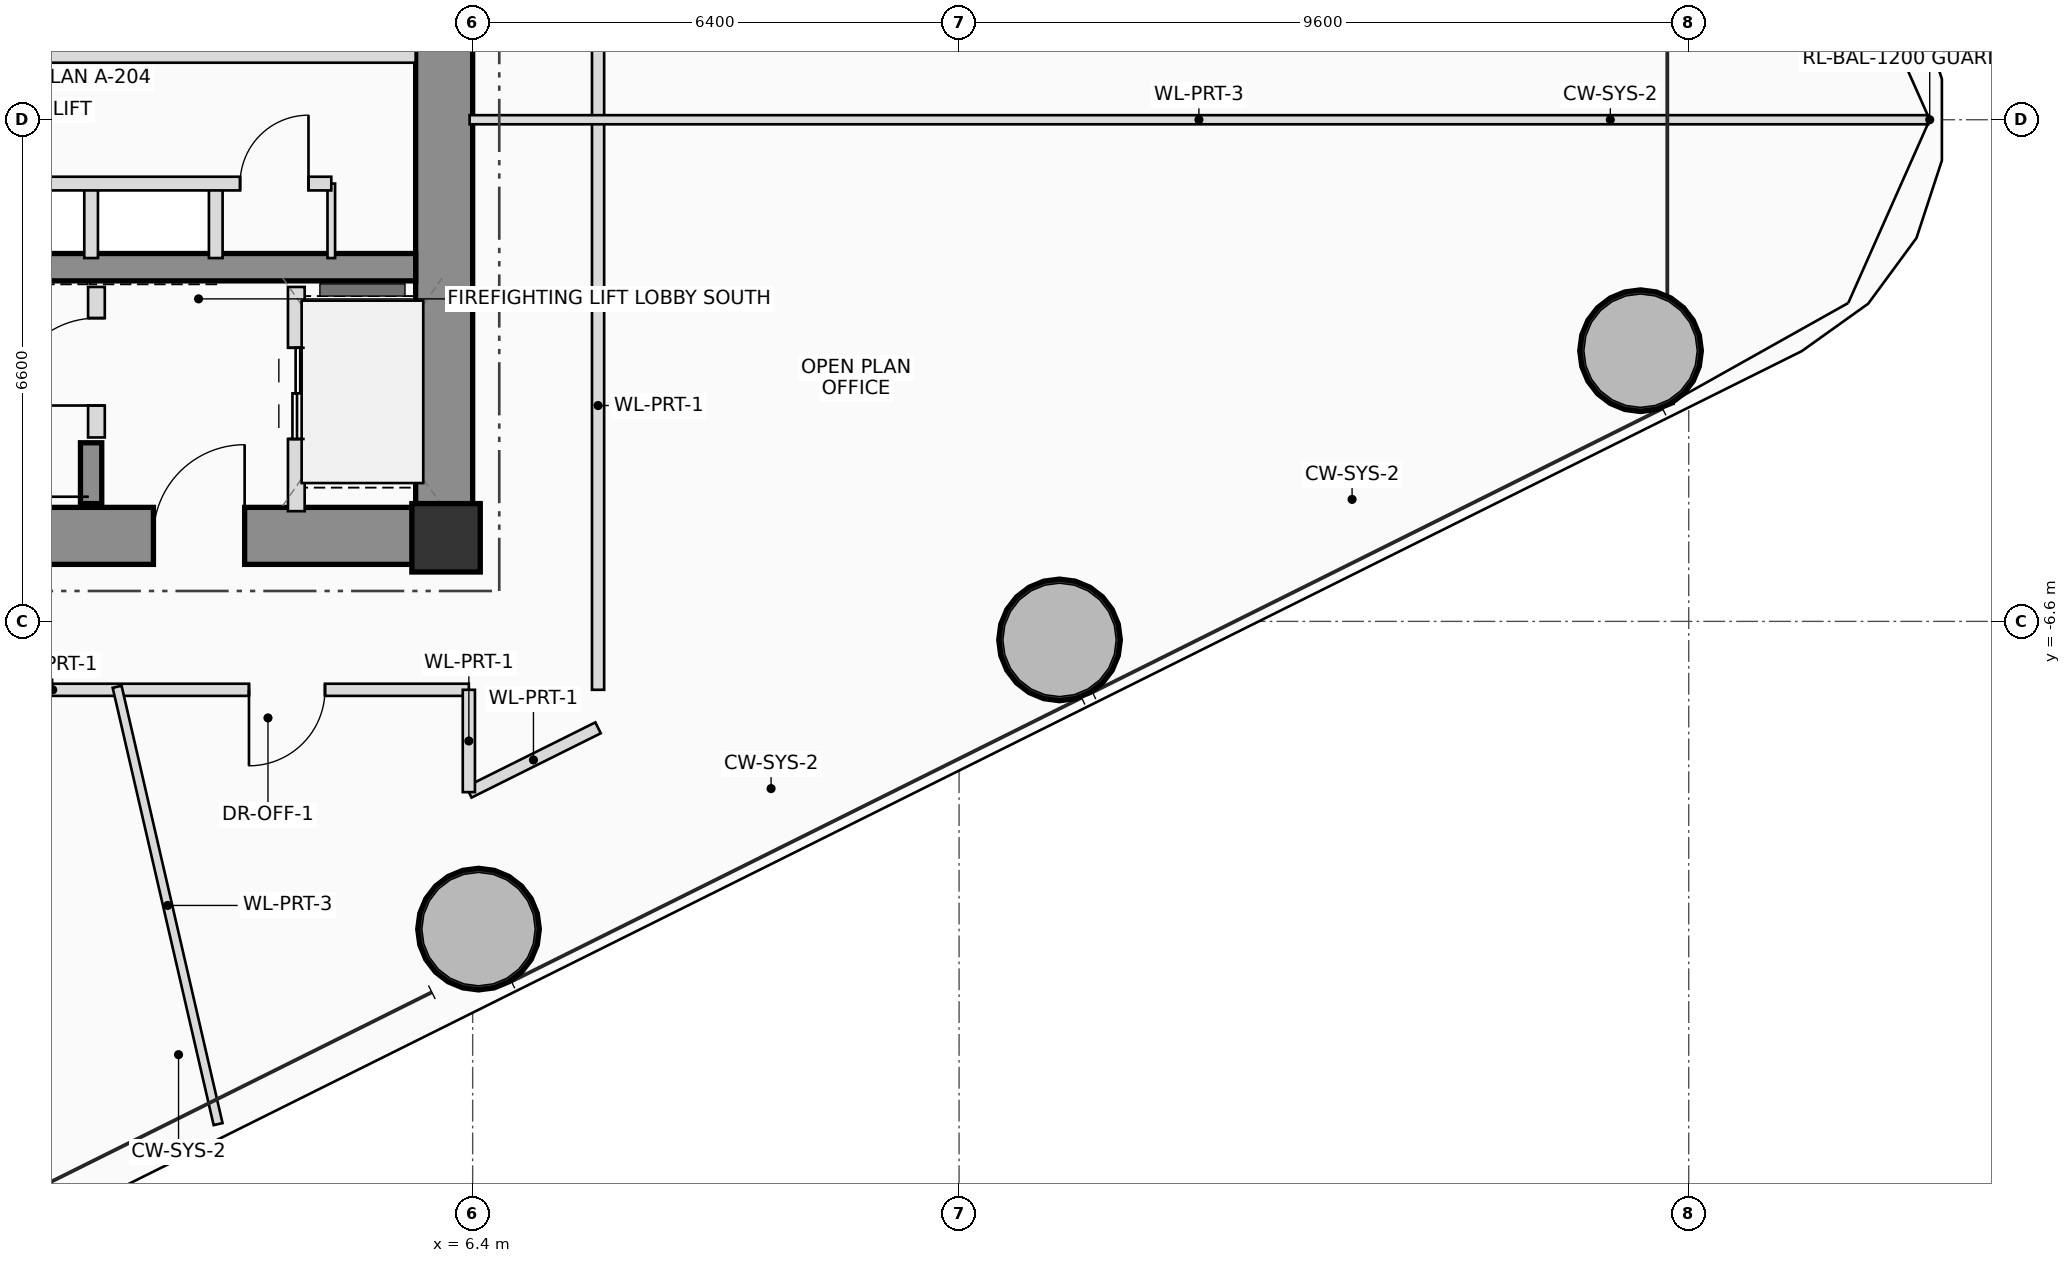
"""IFC4 building model, lengths in metres.
Left out: names, types, materials, properties, quantities, classifications, styles, units other than length and angle.
Written with IfcOpenShell. Run it as: python <this file> out.ifc"""

import sys

from ifc_helpers import new_model, si_unit, direction, frame, frame_2d, origin, origin_2d, place, context, subcontext, project, spatial, rectangle, hollow_circle, extrude, source, transform, mapped, element, fill, save


model = new_model("IFC4")
c1 = context("Model", 3, precision=1e-05, world=origin(), true_north=direction((0.0, 1.0)))
c2 = subcontext(c1, "Body", "Model", "MODEL_VIEW")
j1 = project(units=[si_unit("LENGTHUNIT", "METRE"), si_unit("PLANEANGLEUNIT", "RADIAN")], contexts=[c1])
p1 = place(None, origin())
s1 = spatial("IfcSite", under=j1, at=p1, CompositionType="ELEMENT")
p2 = place(p1, origin())
s2 = spatial("IfcBuilding", under=s1, at=p2, CompositionType="ELEMENT")
p3 = place(p2, frame((0.0, 0.0, 27.5)))
s3 = spatial("IfcBuildingStorey", under=s2, at=p3, CompositionType="ELEMENT", Elevation=27.5)
m1 = source(origin(), c2, "Body", "SweptSolid", [
    extrude(rectangle(XDim=0.9, YDim=0.9, at=origin_2d()), origin(), (0.0, 0.0, 1.0), 3.7),
])
p4 = place(p3, frame((6.05, -5.5, 0.0), z_axis=(0.0, 0.0, 1.0), x_axis=(1.0, 0.0, 0.0)))
e1 = element("IfcColumn", 1, at=p4, inside=s3, PredefinedType="COLUMN", context=c2, shape_type="MappedRepresentation", body=[
    mapped(m1, transform((0.0, 0.0, 0.0), scale=1.0)),
])
p5 = place(p3, frame((-6.4, -5.475, 0.0), z_axis=(0.0, 0.0, 1.0), x_axis=(1.0, 0.0, 0.0)))
e2 = element("IfcWall", 2, at=p5, inside=s3, PredefinedType="SHEAR", context=c2, shape_type="SweptSolid", body=[
    extrude(rectangle(XDim=12.8, YDim=0.75, at=frame_2d((6.4, 0.0))), origin(), (0.0, 0.0, 1.0), 3.7),
])
p6 = place(p5, frame((8.6, 0.0, 0.0)))
e3 = element("IfcOpeningElement", 3, at=p6, cuts=e2, PredefinedType="OPENING", context=c2, shape_type="SweptSolid", body=[
    extrude(rectangle(XDim=1.2, YDim=2.2, at=frame_2d((0.6, 1.1))), frame((0.0, 0.385, 0.0), z_axis=(0.0, -1.0, 0.0), x_axis=(1.0, 0.0, 0.0)), (0.0, 0.0, 1.0), 0.77),
])
p7 = place(p3, frame((6.025, -5.1, 0.0), z_axis=(0.0, 0.0, 1.0), x_axis=(0.0, 1.0, 0.0)))
e4 = element("IfcWall", 4, at=p7, inside=s3, PredefinedType="SHEAR", context=c2, shape_type="SweptSolid", body=[
    extrude(rectangle(XDim=10.2, YDim=0.75, at=frame_2d((5.1, 0.0))), origin(), (0.0, 0.0, 1.0), 3.7),
])
p8 = place(p3, frame((-5.65, -1.94, 0.0), z_axis=(0.0, 0.0, 1.0), x_axis=(1.0, 0.0, 0.0)))
e5 = element("IfcWall", 5, at=p8, inside=s3, PredefinedType="SHEAR", context=c2, shape_type="SweptSolid", body=[
    extrude(rectangle(XDim=11.3, YDim=0.36, at=frame_2d((5.65, 0.0))), origin(), (0.0, 0.0, 1.0), 3.7),
])
p9 = place(p3, frame((1.38, -5.05, 0.0), z_axis=(0.0, 0.0, 1.0), x_axis=(0.0, 1.0, 0.0)))
e6 = element("IfcWall", 6, at=p9, inside=s3, PredefinedType="SHEAR", context=c2, shape_type="SweptSolid", body=[
    extrude(rectangle(XDim=0.8, YDim=0.28, at=frame_2d((0.4, 0.0))), origin(), (0.0, 0.0, 1.0), 3.7),
])
m2 = source(origin(), c2, "Body", "SweptSolid", [
    extrude(hollow_circle(Radius=0.8, WallThickness=0.055, at=origin_2d()), origin(), (0.0, 0.0, 1.0), 3.7),
])
for number, where, z_axis, x_axis in (
    (7, (6.477, -10.648, 0.0), (0.0, 0.0, 1.0), (1.0, 0.0, 0.0)),
    (8, (14.122, -6.844, 0.0), (0.0, 0.0, 1.0), (1.0, 0.0, 0.0)),
    (9, (21.766, -3.039, 0.0), (0.0, 0.0, 1.0), (1.0, 0.0, 0.0)),
):
    element("IfcColumn", number, at=place(p3, frame(where, z_axis=z_axis, x_axis=x_axis)), inside=s3, PredefinedType="COLUMN", context=c2, shape_type="MappedRepresentation", body=[
        mapped(m2, transform((0.0, 0.0, 0.0), scale=1.0)),
    ])
p10 = place(p3, frame((1.45, -4.18, 0.0), z_axis=(0.0, 0.0, 1.0), x_axis=(0.0, 1.0, 0.0)))
e10 = element("IfcWall", 10, at=p10, inside=s3, PredefinedType="PLUMBINGWALL", context=c2, shape_type="SweptSolid", body=[
    extrude(rectangle(XDim=1.98, YDim=0.22, at=frame_2d((0.99, 0.0))), origin(), (0.0, 0.0, 1.0), 3.495),
])
p11 = place(p10, frame((0.42, 0.0, 0.0)))
e11 = element("IfcOpeningElement", 11, at=p11, cuts=e10, PredefinedType="OPENING", context=c2, shape_type="SweptSolid", body=[
    extrude(rectangle(XDim=1.15, YDim=2.15, at=frame_2d((0.575, 1.075))), frame((0.0, 0.12, 0.0), z_axis=(0.0, -1.0, 0.0), x_axis=(1.0, 0.0, 0.0)), (0.0, 0.0, 1.0), 0.24),
])
p12 = place(p3, frame((4.08, -5.15, 0.0), z_axis=(0.0, 0.0, 1.0), x_axis=(0.0, 1.0, 0.0)))
e12 = element("IfcWall", 12, at=p12, inside=s3, PredefinedType="PLUMBINGWALL", context=c2, shape_type="SweptSolid", body=[
    extrude(rectangle(XDim=2.95, YDim=0.22, at=frame_2d((1.475, 0.0))), origin(), (0.0, 0.0, 1.0), 3.495),
])
p13 = place(p12, frame((0.95, 0.0, 0.0)))
e13 = element("IfcOpeningElement", 13, at=p13, cuts=e12, PredefinedType="OPENING", context=c2, shape_type="SweptSolid", body=[
    extrude(rectangle(XDim=1.2, YDim=2.25, at=frame_2d((0.6, 1.125))), frame((0.0, 0.12, 0.0), z_axis=(0.0, -1.0, 0.0), x_axis=(1.0, 0.0, 0.0)), (0.0, 0.0, 1.0), 0.24),
])
for number, where, z_axis, x_axis in (
    (14, (1.38, 0.84, 0.0), (0.0, 0.0, 1.0), (0.0, 1.0, 0.0)),
    (15, (1.38, -1.82, 0.0), (0.0, 0.0, 1.0), (0.0, 1.0, 0.0)),
    (16, (3.02, 0.84, 0.0), (0.0, 0.0, 1.0), (0.0, 1.0, 0.0)),
    (17, (4.38, 0.84, 0.0), (0.0, 0.0, 1.0), (0.0, 1.0, 0.0)),
    (18, (3.02, -1.82, 0.0), (0.0, 0.0, 1.0), (0.0, 1.0, 0.0)),
):
    element("IfcWall", number, at=place(p3, frame(where, z_axis=z_axis, x_axis=x_axis)), inside=s3, PredefinedType="PLUMBINGWALL", context=c2, shape_type="SweptSolid", body=[
        extrude(rectangle(XDim=0.98, YDim=0.18, at=frame_2d((0.49, 0.0))), origin(), (0.0, 0.0, 1.0), 3.495),
    ])
p14 = place(p3, frame((4.54, -1.82, 0.0), z_axis=(0.0, 0.0, 1.0), x_axis=(0.0, 1.0, 0.0)))
e19 = element("IfcWall", 19, at=p14, inside=s3, PredefinedType="PARTITIONING", context=c2, shape_type="SweptSolid", body=[
    extrude(rectangle(XDim=0.98, YDim=0.1, at=frame_2d((0.49, 0.0))), origin(), (0.0, 0.0, 1.0), 3.495),
])
p15 = place(p3, frame((-5.68, 0.84, 0.0), z_axis=(0.0, 0.0, 1.0), x_axis=(1.0, 0.0, 0.0)))
e20 = element("IfcWall", 20, at=p15, inside=s3, PredefinedType="PLUMBINGWALL", context=c2, shape_type="SweptSolid", body=[
    extrude(rectangle(XDim=11.33, YDim=0.18, at=frame_2d((5.665, 0.0))), origin(), (0.0, 0.0, 1.0), 3.495),
])
p16 = place(p15, frame((0.43, 0.0, 0.0)))
e21 = element("IfcOpeningElement", 21, at=p16, cuts=e20, PredefinedType="OPENING", context=c2, shape_type="SweptSolid", body=[
    extrude(rectangle(XDim=1.1, YDim=2.2, at=frame_2d((0.55, 1.1))), frame((0.0, 0.1, 0.0), z_axis=(0.0, -1.0, 0.0), x_axis=(1.0, 0.0, 0.0)), (0.0, 0.0, 1.0), 0.2),
])
p17 = place(p15, frame((2.13, 0.0, 0.0)))
e22 = element("IfcOpeningElement", 22, at=p17, cuts=e20, PredefinedType="OPENING", context=c2, shape_type="SweptSolid", body=[
    extrude(rectangle(XDim=1.1, YDim=2.2, at=frame_2d((0.55, 1.1))), frame((0.0, 0.1, 0.0), z_axis=(0.0, -1.0, 0.0), x_axis=(1.0, 0.0, 0.0)), (0.0, 0.0, 1.0), 0.2),
])
p18 = place(p3, frame((-5.68, -0.84, 0.0), z_axis=(0.0, 0.0, 1.0), x_axis=(1.0, 0.0, 0.0)))
e23 = element("IfcWall", 23, at=p18, inside=s3, PredefinedType="PLUMBINGWALL", context=c2, shape_type="SweptSolid", body=[
    extrude(rectangle(XDim=10.22, YDim=0.18, at=frame_2d((5.11, 0.0))), origin(), (0.0, 0.0, 1.0), 3.495),
])
p19 = place(p18, frame((0.43, 0.0, 0.0)))
e24 = element("IfcOpeningElement", 24, at=p19, cuts=e23, PredefinedType="OPENING", context=c2, shape_type="SweptSolid", body=[
    extrude(rectangle(XDim=1.1, YDim=2.2, at=frame_2d((0.55, 1.1))), frame((0.0, 0.1, 0.0), z_axis=(0.0, -1.0, 0.0), x_axis=(1.0, 0.0, 0.0)), (0.0, 0.0, 1.0), 0.2),
])
p20 = place(p18, frame((2.13, 0.0, 0.0)))
e25 = element("IfcOpeningElement", 25, at=p20, cuts=e23, PredefinedType="OPENING", context=c2, shape_type="SweptSolid", body=[
    extrude(rectangle(XDim=1.1, YDim=2.2, at=frame_2d((0.55, 1.1))), frame((0.0, 0.1, 0.0), z_axis=(0.0, -1.0, 0.0), x_axis=(1.0, 0.0, 0.0)), (0.0, 0.0, 1.0), 0.2),
])
p21 = place(p18, frame((9.02, 0.0, 0.0)))
e26 = element("IfcOpeningElement", 26, at=p21, cuts=e23, PredefinedType="OPENING", context=c2, shape_type="SweptSolid", body=[
    extrude(rectangle(XDim=0.9, YDim=2.05, at=frame_2d((0.45, 1.025))), frame((0.0, 0.1, 0.0), z_axis=(0.0, -1.0, 0.0), x_axis=(1.0, 0.0, 0.0)), (0.0, 0.0, 1.0), 0.2),
])
p22 = place(p3, frame((6.35, -7.5, 0.0), z_axis=(0.0, 0.0, 1.0), x_axis=(-1.0, 0.0, 0.0)))
e27 = element("IfcWall", 27, at=p22, inside=s3, PredefinedType="PARTITIONING", context=c2, shape_type="SweptSolid", body=[
    extrude(rectangle(XDim=12.7, YDim=0.16, at=frame_2d((6.35, 0.0))), origin(), (0.0, 0.0, 1.0), 2.8),
])
p23 = place(p22, frame((1.893, 0.0, 0.0)))
e28 = element("IfcOpeningElement", 28, at=p23, cuts=e27, PredefinedType="OPENING", context=c2, shape_type="SweptSolid", body=[
    extrude(rectangle(XDim=1.0, YDim=2.25, at=frame_2d((0.5, 1.125))), frame((0.0, 0.09, 0.0), z_axis=(0.0, -1.0, 0.0), x_axis=(1.0, 0.0, 0.0)), (0.0, 0.0, 1.0), 0.18),
])
p24 = place(p22, frame((8.057, 0.0, 0.0)))
e29 = element("IfcOpeningElement", 29, at=p24, cuts=e27, PredefinedType="OPENING", context=c2, shape_type="SweptSolid", body=[
    extrude(rectangle(XDim=1.0, YDim=2.25, at=frame_2d((0.5, 1.125))), frame((0.0, 0.09, 0.0), z_axis=(0.0, -1.0, 0.0), x_axis=(1.0, 0.0, 0.0)), (0.0, 0.0, 1.0), 0.18),
])
for number, where, z_axis, x_axis in (
    (30, (8.05, 7.5, 0.0), (0.0, 0.0, 1.0), (0.0, -1.0, 0.0)),
    (31, (8.05, -0.02, 0.0), (0.0, 0.0, 1.0), (0.0, -1.0, 0.0)),
):
    element("IfcWall", number, at=place(p3, frame(where, z_axis=z_axis, x_axis=x_axis)), inside=s3, PredefinedType="PARTITIONING", context=c2, shape_type="SweptSolid", body=[
        extrude(rectangle(XDim=7.48, YDim=0.16, at=frame_2d((3.74, 0.0))), origin(), (0.0, 0.0, 1.0), 2.8),
    ])
p25 = place(p3, frame((8.05, -8.0, 0.0), z_axis=(0.0, 0.0, 1.0), x_axis=(-0.895274181873, -0.445515588136, 0.0)))
e32 = element("IfcWall", 32, at=p25, inside=s3, PredefinedType="PARTITIONING", context=c2, shape_type="SweptSolid", body=[
    extrude(rectangle(XDim=1.899, YDim=0.16, at=frame_2d((0.949, 0.0))), origin(), (0.0, 0.0, 1.0), 2.8),
])
p26 = place(p3, frame((6.35, -8.846, 0.0), z_axis=(0.0, 0.0, 1.0), x_axis=(0.0, 1.0, 0.0)))
e33 = element("IfcWall", 33, at=p26, inside=s3, PredefinedType="PARTITIONING", context=c2, shape_type="SweptSolid", body=[
    extrude(rectangle(XDim=1.346, YDim=0.16, at=frame_2d((0.673, 0.0))), origin(), (0.0, 0.0, 1.0), 2.8),
])
p27 = place(p3, frame((6.36, 0.0, 0.0), z_axis=(0.0, 0.0, 1.0), x_axis=(1.0, 0.0, 0.0)))
e34 = element("IfcWall", 34, at=p27, inside=s3, PredefinedType="PARTITIONING", context=c2, shape_type="SweptSolid", body=[
    extrude(rectangle(XDim=19.191, YDim=0.12, at=frame_2d((9.595, 0.0))), origin(), (0.0, 0.0, 1.0), 2.96),
])
p28 = place(p3, frame((1.722, -7.46, 0.0), z_axis=(0.0, 0.0, 1.0), x_axis=(0.22494706926, -0.974370984806, 0.0)))
e35 = element("IfcWall", 35, at=p28, inside=s3, PredefinedType="PARTITIONING", context=c2, shape_type="SweptSolid", body=[
    extrude(rectangle(XDim=5.905, YDim=0.12, at=frame_2d((2.953, 0.0))), origin(), (0.0, 0.0, 1.0), 2.96),
])
p29 = place(p6, origin())
e36 = element("IfcDoor", 36, at=p29, inside=s3, OperationType="SINGLE_SWING_RIGHT", PredefinedType="DOOR", context=c2, shape_type="SweptSolid", body=[
    extrude(rectangle(XDim=1.2, YDim=2.2, at=frame_2d((0.6, 1.1))), frame((0.0, 0.025, 0.0), z_axis=(0.0, -1.0, 0.0), x_axis=(1.0, 0.0, 0.0)), (0.0, 0.0, 1.0), 0.05),
])
fill(e3, e36)
p30 = place(p11, origin())
e37 = element("IfcDoor", 37, at=p30, inside=s3, OperationType="SINGLE_SWING_LEFT", PredefinedType="DOOR", context=c2, shape_type="SweptSolid", body=[
    extrude(rectangle(XDim=1.15, YDim=2.15, at=frame_2d((0.575, 1.075))), frame((0.0, 0.025, 0.0), z_axis=(0.0, -1.0, 0.0), x_axis=(1.0, 0.0, 0.0)), (0.0, 0.0, 1.0), 0.05),
])
fill(e11, e37)
p31 = place(p13, origin())
e38 = element("IfcDoor", 38, at=p31, inside=s3, OperationType="DOUBLE_DOOR_SLIDING", PredefinedType="DOOR", context=c2, shape_type="SweptSolid", body=[
    extrude(rectangle(XDim=1.2, YDim=2.25, at=frame_2d((0.6, 1.125))), frame((0.0, 0.025, 0.0), z_axis=(0.0, -1.0, 0.0), x_axis=(1.0, 0.0, 0.0)), (0.0, 0.0, 1.0), 0.05),
])
fill(e13, e38)
p32 = place(p21, origin())
e39 = element("IfcDoor", 39, at=p32, inside=s3, OperationType="SINGLE_SWING_RIGHT", PredefinedType="DOOR", context=c2, shape_type="SweptSolid", body=[
    extrude(rectangle(XDim=0.9, YDim=2.05, at=frame_2d((0.45, 1.025))), frame((0.0, 0.025, 0.0), z_axis=(0.0, -1.0, 0.0), x_axis=(1.0, 0.0, 0.0)), (0.0, 0.0, 1.0), 0.05),
])
fill(e26, e39)
p33 = place(p23, origin())
e40 = element("IfcDoor", 40, at=p33, inside=s3, OperationType="SINGLE_SWING_RIGHT", PredefinedType="DOOR", context=c2, shape_type="SweptSolid", body=[
    extrude(rectangle(XDim=1.0, YDim=2.25, at=frame_2d((0.5, 1.125))), frame((0.0, 0.025, 0.0), z_axis=(0.0, -1.0, 0.0), x_axis=(1.0, 0.0, 0.0)), (0.0, 0.0, 1.0), 0.05),
])
fill(e28, e40)
save(model, sys.argv[1])
